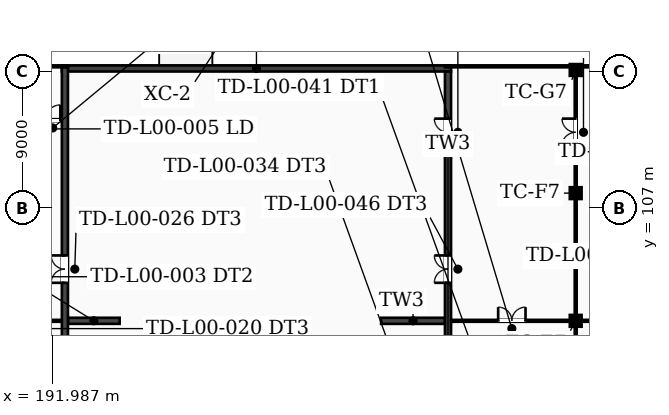
"""IFC4 building model, lengths in metres.
Left out: names, types, materials, properties, quantities, classifications, styles, units other than length and angle.
Written with IfcOpenShell. Run it as: python <this file> out.ifc"""

import sys

from ifc_helpers import new_model, si_unit, direction, frame, frame_2d, origin, origin_2d, place, context, subcontext, project, spatial, rectangle, extrude, element, fill, save


model = new_model("IFC4")
c1 = context("Model", 3, precision=1e-05, world=origin(), true_north=direction((0.0, 1.0)))
c2 = subcontext(c1, "Body", "Model", "MODEL_VIEW")
j1 = project(units=[si_unit("LENGTHUNIT", "METRE"), si_unit("PLANEANGLEUNIT", "RADIAN")], contexts=[c1])
p1 = place(None, origin())
s1 = spatial("IfcSite", under=j1, at=p1, CompositionType="ELEMENT")
p2 = place(p1, origin())
s2 = spatial("IfcBuilding", under=s1, at=p2, CompositionType="ELEMENT")
p3 = place(p2, origin())
s3 = spatial("IfcBuildingStorey", under=s2, at=p3, CompositionType="ELEMENT", Elevation=0.0)
p4 = place(p3, frame((184.7, 99.6, 0.0), z_axis=(0.0, 0.0, 1.0), x_axis=(1.0, 0.0, 0.0)))
e1 = element("IfcWall", 1, at=p4, inside=s3, PredefinedType="PARTITIONING", context=c2, shape_type="SweptSolid", body=[
    extrude(rectangle(XDim=7.9, YDim=0.125, at=frame_2d((3.95, 0.0))), origin(), (0.0, 0.0, 1.0), 8.7),
])
p5 = place(p4, frame((1.9, 0.0, 0.0)))
e2 = element("IfcOpeningElement", 2, at=p5, cuts=e1, PredefinedType="OPENING", context=c2, shape_type="SweptSolid", body=[
    extrude(rectangle(XDim=1.8, YDim=2.1, at=frame_2d((0.9, 1.05))), frame((0.0, 0.073, 0.0), z_axis=(0.0, -1.0, 0.0), x_axis=(1.0, 0.0, 0.0)), (0.0, 0.0, 1.0), 0.145),
])
p6 = place(p3, frame((193.0, 99.6, 0.0), z_axis=(0.0, 0.0, 1.0), x_axis=(1.0, 0.0, 0.0)))
e3 = element("IfcWall", 3, at=p6, inside=s3, PredefinedType="SOLIDWALL", context=c2, shape_type="SweptSolid", body=[
    extrude(rectangle(XDim=3.4, YDim=0.4, at=frame_2d((1.7, 0.0))), origin(), (0.0, 0.0, 1.0), 8.7),
])
p7 = place(p3, frame((213.6, 99.6, 0.0), z_axis=(0.0, 0.0, 1.0), x_axis=(1.0, 0.0, 0.0)))
e4 = element("IfcWall", 4, at=p7, inside=s3, PredefinedType="SOLIDWALL", context=c2, shape_type="SweptSolid", body=[
    extrude(rectangle(XDim=4.2, YDim=0.4, at=frame_2d((2.1, 0.0))), origin(), (0.0, 0.0, 1.0), 8.7),
])
p8 = place(p3, frame((218.2, 99.6, 0.0), z_axis=(0.0, 0.0, 1.0), x_axis=(1.0, 0.0, 0.0)))
e5 = element("IfcWall", 5, at=p8, inside=s3, PredefinedType="PARTITIONING", context=c2, shape_type="SweptSolid", body=[
    extrude(rectangle(XDim=7.9, YDim=0.125, at=frame_2d((3.95, 0.0))), origin(), (0.0, 0.0, 1.0), 8.7),
])
p9 = place(p8, frame((3.1, 0.0, 0.0)))
e6 = element("IfcOpeningElement", 6, at=p9, cuts=e5, PredefinedType="OPENING", context=c2, shape_type="SweptSolid", body=[
    extrude(rectangle(XDim=1.8, YDim=2.1, at=frame_2d((0.9, 1.05))), frame((0.0, 0.073, 0.0), z_axis=(0.0, -1.0, 0.0), x_axis=(1.0, 0.0, 0.0)), (0.0, 0.0, 1.0), 0.145),
])
p10 = place(p3, frame((226.7, 99.6, 0.0), z_axis=(0.0, 0.0, 1.0), x_axis=(1.0, 0.0, 0.0)))
e7 = element("IfcWall", 7, at=p10, inside=s3, PredefinedType="PARTITIONING", context=c2, shape_type="SweptSolid", body=[
    extrude(rectangle(XDim=4.025, YDim=0.125, at=frame_2d((2.013, 0.0))), origin(), (0.0, 0.0, 1.0), 8.7),
])
p11 = place(p3, frame((191.075, 112.8, 0.0), z_axis=(0.0, 0.0, 1.0), x_axis=(1.0, 0.0, 0.0)))
e8 = element("IfcWall", 8, at=p11, inside=s3, PredefinedType="PARTITIONING", context=c2, shape_type="SweptSolid", body=[
    extrude(rectangle(XDim=1.525, YDim=0.125, at=frame_2d((0.763, 0.0))), origin(), (0.0, 0.0, 1.0), 8.7),
])
p12 = place(p11, frame((0.425, 0.0, 0.0)))
e9 = element("IfcOpeningElement", 9, at=p12, cuts=e8, PredefinedType="OPENING", context=c2, shape_type="SweptSolid", body=[
    extrude(rectangle(XDim=1.0, YDim=2.1, at=frame_2d((0.5, 1.05))), frame((0.0, 0.073, 0.0), z_axis=(0.0, -1.0, 0.0), x_axis=(1.0, 0.0, 0.0)), (0.0, 0.0, 1.0), 0.145),
])
p13 = place(p3, frame((192.6, 116.2, 0.0), z_axis=(0.0, 0.0, 1.0), x_axis=(1.0, 0.0, 0.0)))
e10 = element("IfcWall", 10, at=p13, inside=s3, PredefinedType="SOLIDWALL", context=c2, shape_type="SweptSolid", body=[
    extrude(rectangle(XDim=25.6, YDim=0.4, at=frame_2d((12.8, 0.0))), origin(), (0.0, 0.0, 1.0), 8.7),
])
p14 = place(p3, frame((191.075, 116.337, 0.0), z_axis=(0.0, 0.0, 1.0), x_axis=(1.0, 0.0, 0.0)))
e11 = element("IfcWall", 11, at=p14, inside=s3, PredefinedType="PARTITIONING", context=c2, shape_type="SweptSolid", body=[
    extrude(rectangle(XDim=1.925, YDim=0.125, at=frame_2d((0.962, 0.0))), origin(), (0.0, 0.0, 1.0), 8.7),
])
p15 = place(p3, frame((217.8, 116.337, 0.0), z_axis=(0.0, 0.0, 1.0), x_axis=(1.0, 0.0, 0.0)))
e12 = element("IfcWall", 12, at=p15, inside=s3, PredefinedType="PARTITIONING", context=c2, shape_type="SweptSolid", body=[
    extrude(rectangle(XDim=8.3, YDim=0.125, at=frame_2d((4.15, 0.0))), origin(), (0.0, 0.0, 1.0), 8.7),
])
p16 = place(p3, frame((226.7, 116.337, 0.0), z_axis=(0.0, 0.0, 1.0), x_axis=(1.0, 0.0, 0.0)))
e13 = element("IfcWall", 13, at=p16, inside=s3, PredefinedType="PARTITIONING", context=c2, shape_type="SweptSolid", body=[
    extrude(rectangle(XDim=8.225, YDim=0.125, at=frame_2d((4.113, 0.0))), origin(), (0.0, 0.0, 1.0), 8.7),
])
p17 = place(p3, frame((192.8, 66.125, 0.0), z_axis=(0.0, 0.0, 1.0), x_axis=(0.0, 1.0, 0.0)))
e14 = element("IfcWall", 14, at=p17, inside=s3, PredefinedType="SOLIDWALL", context=c2, shape_type="SweptSolid", body=[
    extrude(rectangle(XDim=50.15, YDim=0.4, at=frame_2d((25.075, 0.0))), origin(), (0.0, 0.0, 1.0), 8.7),
])
p18 = place(p17, frame((18.975, 0.0, 0.0)))
e15 = element("IfcOpeningElement", 15, at=p18, cuts=e14, PredefinedType="OPENING", context=c2, shape_type="SweptSolid", body=[
    extrude(rectangle(XDim=1.8, YDim=2.1, at=frame_2d((0.9, 1.05))), frame((0.0, 0.21, 0.0), z_axis=(0.0, -1.0, 0.0), x_axis=(1.0, 0.0, 0.0)), (0.0, 0.0, 1.0), 0.42),
])
p19 = place(p17, frame((26.975, 0.0, 0.0)))
e16 = element("IfcOpeningElement", 16, at=p19, cuts=e14, PredefinedType="OPENING", context=c2, shape_type="SweptSolid", body=[
    extrude(rectangle(XDim=1.8, YDim=2.1, at=frame_2d((0.9, 1.05))), frame((0.0, 0.21, 0.0), z_axis=(0.0, -1.0, 0.0), x_axis=(1.0, 0.0, 0.0)), (0.0, 0.0, 1.0), 0.42),
])
p20 = place(p17, frame((35.975, 0.0, 0.0)))
e17 = element("IfcOpeningElement", 17, at=p20, cuts=e14, PredefinedType="OPENING", context=c2, shape_type="SweptSolid", body=[
    extrude(rectangle(XDim=1.8, YDim=2.1, at=frame_2d((0.9, 1.05))), frame((0.0, 0.21, 0.0), z_axis=(0.0, -1.0, 0.0), x_axis=(1.0, 0.0, 0.0)), (0.0, 0.0, 1.0), 0.42),
])
p21 = place(p3, frame((218.0, 66.4, 0.0), z_axis=(0.0, 0.0, 1.0), x_axis=(0.0, 1.0, 0.0)))
e18 = element("IfcWall", 18, at=p21, inside=s3, PredefinedType="SOLIDWALL", context=c2, shape_type="SweptSolid", body=[
    extrude(rectangle(XDim=49.6, YDim=0.4, at=frame_2d((24.8, 0.0))), origin(), (0.0, 0.0, 1.0), 8.7),
])
p22 = place(p21, frame((18.2, 0.0, 0.0)))
e19 = element("IfcOpeningElement", 19, at=p22, cuts=e18, PredefinedType="OPENING", context=c2, shape_type="SweptSolid", body=[
    extrude(rectangle(XDim=1.8, YDim=2.1, at=frame_2d((0.9, 1.05))), frame((0.0, 0.21, 0.0), z_axis=(0.0, -1.0, 0.0), x_axis=(1.0, 0.0, 0.0)), (0.0, 0.0, 1.0), 0.42),
])
p23 = place(p21, frame((35.7, 0.0, 0.0)))
e20 = element("IfcOpeningElement", 20, at=p23, cuts=e18, PredefinedType="OPENING", context=c2, shape_type="SweptSolid", body=[
    extrude(rectangle(XDim=1.8, YDim=2.1, at=frame_2d((0.9, 1.05))), frame((0.0, 0.21, 0.0), z_axis=(0.0, -1.0, 0.0), x_axis=(1.0, 0.0, 0.0)), (0.0, 0.0, 1.0), 0.42),
])
p24 = place(p21, frame((44.7, 0.0, 0.0)))
e21 = element("IfcOpeningElement", 21, at=p24, cuts=e18, PredefinedType="OPENING", context=c2, shape_type="SweptSolid", body=[
    extrude(rectangle(XDim=1.8, YDim=2.1, at=frame_2d((0.9, 1.05))), frame((0.0, 0.21, 0.0), z_axis=(0.0, -1.0, 0.0), x_axis=(1.0, 0.0, 0.0)), (0.0, 0.0, 1.0), 0.42),
])
for number, where, z_axis, x_axis in (
    (22, (226.4, 91.5, 0.0), (0.0, 0.0, 1.0), (0.0, 1.0, 0.0)),
    (23, (226.4, 99.9, 0.0), (0.0, 0.0, 1.0), (0.0, 1.0, 0.0)),
):
    element("IfcWall", number, at=place(p3, frame(where, z_axis=z_axis, x_axis=x_axis)), inside=s3, PredefinedType="PARTITIONING", context=c2, shape_type="SweptSolid", body=[
        extrude(rectangle(XDim=7.8, YDim=0.125, at=frame_2d((3.9, 0.0))), origin(), (0.0, 0.0, 1.0), 8.7),
    ])
p25 = place(p3, frame((226.4, 108.3, 0.0), z_axis=(0.0, 0.0, 1.0), x_axis=(0.0, 1.0, 0.0)))
e24 = element("IfcWall", 24, at=p25, inside=s3, PredefinedType="PARTITIONING", context=c2, shape_type="SweptSolid", body=[
    extrude(rectangle(XDim=7.5, YDim=0.125, at=frame_2d((3.75, 0.0))), origin(), (0.0, 0.0, 1.0), 8.7),
])
p26 = place(p25, frame((2.8, 0.0, 0.0)))
e25 = element("IfcOpeningElement", 25, at=p26, cuts=e24, PredefinedType="OPENING", context=c2, shape_type="SweptSolid", body=[
    extrude(rectangle(XDim=1.8, YDim=2.1, at=frame_2d((0.9, 1.05))), frame((0.0, 0.073, 0.0), z_axis=(0.0, -1.0, 0.0), x_axis=(1.0, 0.0, 0.0)), (0.0, 0.0, 1.0), 0.145),
])
for number, where, z_axis, x_axis in (
    (26, (226.4, 99.6, 0.0), (0.0, 0.0, 1.0), (1.0, 0.0, 0.0)),
    (27, (226.4, 108.0, 0.0), (0.0, 0.0, 1.0), (1.0, 0.0, 0.0)),
    (28, (226.4, 116.1, 0.0), (0.0, 0.0, 1.0), (1.0, 0.0, 0.0)),
):
    element("IfcColumn", number, at=place(p3, frame(where, z_axis=z_axis, x_axis=x_axis)), inside=s3, PredefinedType="COLUMN", context=c2, shape_type="SweptSolid", body=[
        extrude(rectangle(XDim=0.6, YDim=0.6, at=origin_2d()), origin(), (0.0, 0.0, 1.0), 8.7),
    ])
p27 = place(p12, origin())
e29 = element("IfcDoor", 29, at=p27, inside=s3, OperationType="SINGLE_SWING_RIGHT", PredefinedType="DOOR", context=c2, shape_type="SweptSolid", body=[
    extrude(rectangle(XDim=1.0, YDim=2.1, at=frame_2d((0.5, 1.05))), frame((0.0, 0.025, 0.0), z_axis=(0.0, -1.0, 0.0), x_axis=(1.0, 0.0, 0.0)), (0.0, 0.0, 1.0), 0.05),
])
fill(e9, e29)
p28 = place(p20, origin())
e30 = element("IfcDoor", 30, at=p28, inside=s3, OperationType="DOUBLE_DOOR_SINGLE_SWING", PredefinedType="DOOR", context=c2, shape_type="SweptSolid", body=[
    extrude(rectangle(XDim=1.8, YDim=2.1, at=frame_2d((0.9, 1.05))), frame((0.0, 0.025, 0.0), z_axis=(0.0, -1.0, 0.0), x_axis=(1.0, 0.0, 0.0)), (0.0, 0.0, 1.0), 0.05),
])
fill(e17, e30)
p29 = place(p9, origin())
e31 = element("IfcDoor", 31, at=p29, inside=s3, OperationType="DOUBLE_DOOR_SINGLE_SWING", PredefinedType="DOOR", context=c2, shape_type="SweptSolid", body=[
    extrude(rectangle(XDim=1.8, YDim=2.1, at=frame_2d((0.9, 1.05))), frame((0.0, 0.025, 0.0), z_axis=(0.0, -1.0, 0.0), x_axis=(1.0, 0.0, 0.0)), (0.0, 0.0, 1.0), 0.05),
])
fill(e6, e31)
p30 = place(p23, origin())
e32 = element("IfcDoor", 32, at=p30, inside=s3, OperationType="DOUBLE_DOOR_SINGLE_SWING", PredefinedType="DOOR", context=c2, shape_type="SweptSolid", body=[
    extrude(rectangle(XDim=1.8, YDim=2.1, at=frame_2d((0.9, 1.05))), frame((0.0, 0.025, 0.0), z_axis=(0.0, -1.0, 0.0), x_axis=(1.0, 0.0, 0.0)), (0.0, 0.0, 1.0), 0.05),
])
fill(e20, e32)
p31 = place(p24, origin())
e33 = element("IfcDoor", 33, at=p31, inside=s3, OperationType="DOUBLE_DOOR_SINGLE_SWING", PredefinedType="DOOR", context=c2, shape_type="SweptSolid", body=[
    extrude(rectangle(XDim=1.8, YDim=2.1, at=frame_2d((0.9, 1.05))), frame((0.0, 0.025, 0.0), z_axis=(0.0, -1.0, 0.0), x_axis=(1.0, 0.0, 0.0)), (0.0, 0.0, 1.0), 0.05),
])
fill(e21, e33)
p32 = place(p26, origin())
e34 = element("IfcDoor", 34, at=p32, inside=s3, OperationType="DOUBLE_DOOR_SINGLE_SWING", PredefinedType="DOOR", context=c2, shape_type="SweptSolid", body=[
    extrude(rectangle(XDim=1.8, YDim=2.1, at=frame_2d((0.9, 1.05))), frame((0.0, 0.025, 0.0), z_axis=(0.0, -1.0, 0.0), x_axis=(1.0, 0.0, 0.0)), (0.0, 0.0, 1.0), 0.05),
])
fill(e25, e34)
save(model, sys.argv[1])
